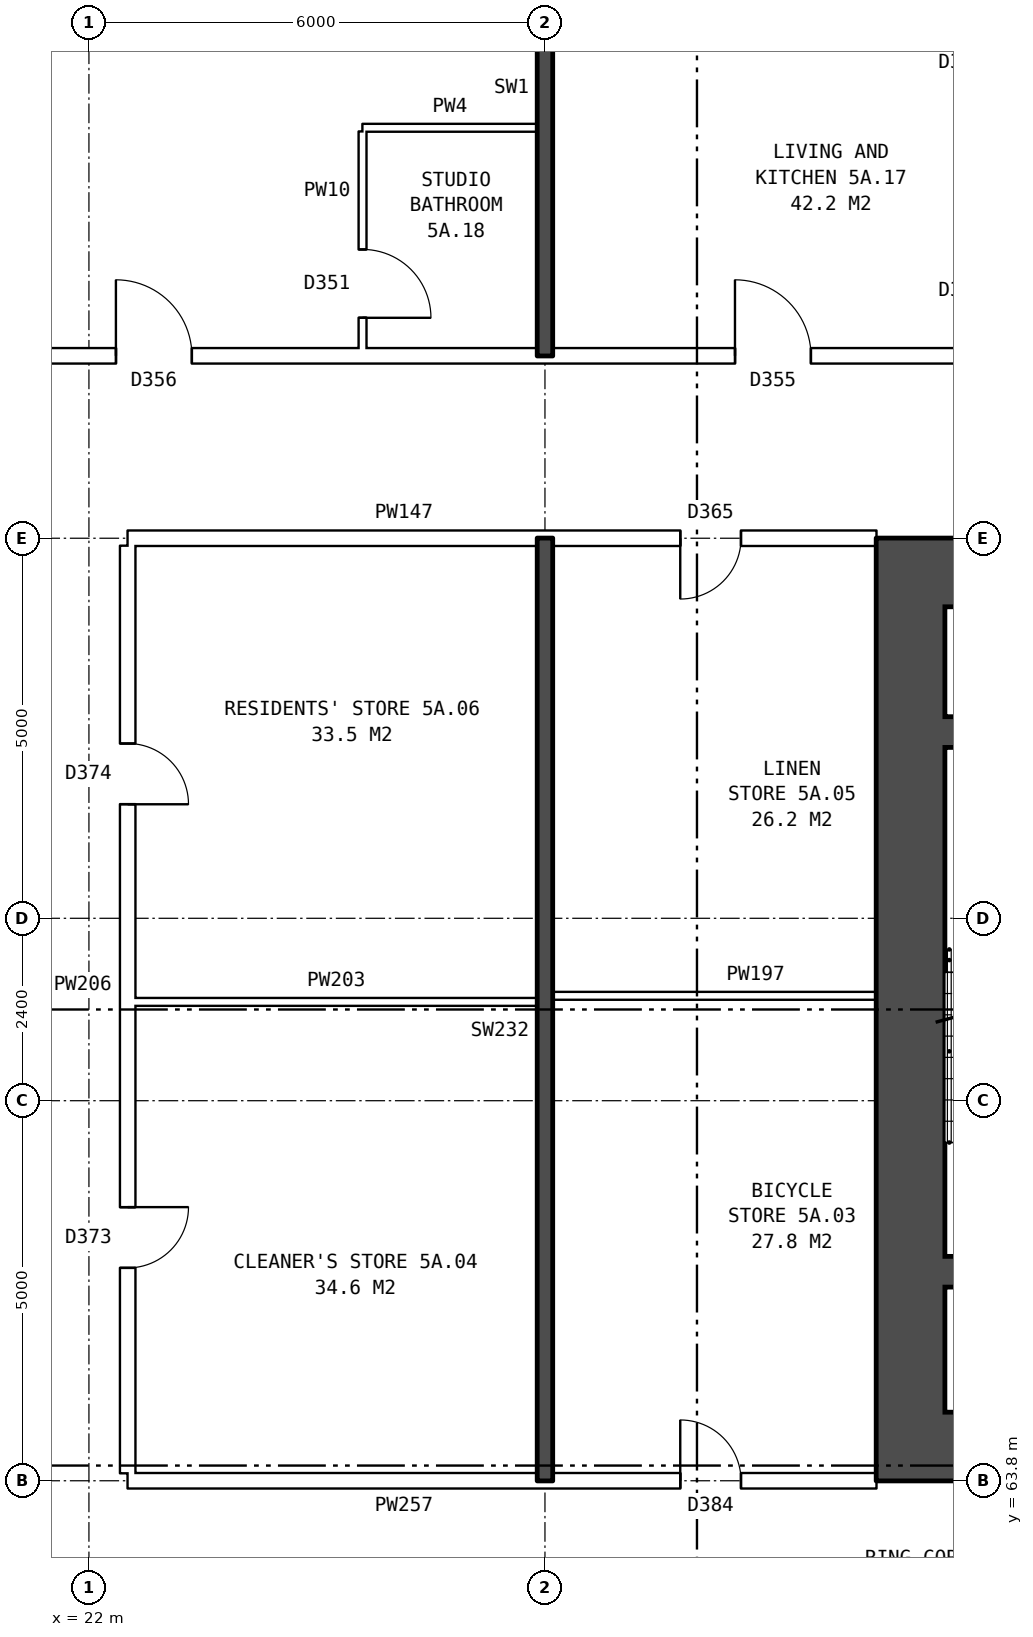
"""IFC4 building model, lengths in metres.
Left out: names, types, materials, properties, quantities, classifications, styles, units other than length and angle.
Written with IfcOpenShell. Run it as: python <this file> out.ifc"""

import sys

from ifc_helpers import new_model, si_unit, direction, frame, frame_2d, origin, place, context, subcontext, project, spatial, rectangle, extrude, element, fill, save


model = new_model("IFC4")
c1 = context("Model", 3, precision=1e-05, world=origin(), true_north=direction((0.0, 1.0)))
c2 = subcontext(c1, "Body", "Model", "MODEL_VIEW")
j1 = project(units=[si_unit("LENGTHUNIT", "METRE"), si_unit("PLANEANGLEUNIT", "RADIAN")], contexts=[c1])
p1 = place(None, origin())
s1 = spatial("IfcSite", under=j1, at=p1, CompositionType="ELEMENT")
p2 = place(p1, origin())
s2 = spatial("IfcBuilding", under=s1, at=p2, CompositionType="ELEMENT")
p3 = place(p2, frame((0.0, 0.0, 22.6)))
s3 = spatial("IfcBuildingStorey", under=s2, at=p3, CompositionType="ELEMENT", Elevation=22.6)
p4 = place(p3, frame((32.81, 75.3, 0.0), z_axis=(0.0, 0.0, 1.0), x_axis=(0.0, -1.0, 0.0)))
e1 = element("IfcWall", 1, at=p4, inside=s3, PredefinedType="SHEAR", context=c2, shape_type="SweptSolid", body=[
    extrude(rectangle(XDim=10.6, YDim=0.9, at=frame_2d((5.3, 0.0))), origin(), (0.0, 0.0, 1.0), 2.85),
])
for number, where, z_axis, x_axis in (
    (2, (41.36, 75.75, 0.0), (0.0, 0.0, 1.0), (-1.0, 0.0, 0.0)),
    (3, (41.36, 64.25, 0.0), (0.0, 0.0, 1.0), (-1.0, 0.0, 0.0)),
):
    element("IfcWall", number, at=place(p3, frame(where, z_axis=z_axis, x_axis=x_axis)), inside=s3, PredefinedType="SHEAR", context=c2, shape_type="SweptSolid", body=[
        extrude(rectangle(XDim=9.0, YDim=0.9, at=frame_2d((4.5, 0.0))), origin(), (0.0, 0.0, 1.0), 2.85),
    ])
for number, where, z_axis, x_axis in (
    (4, (36.26, 73.65, 0.0), (0.0, 0.0, 1.0), (-1.0, 0.0, 0.0)),
    (5, (36.26, 66.55, 0.0), (0.0, 0.0, 1.0), (-1.0, 0.0, 0.0)),
):
    element("IfcWall", number, at=place(p3, frame(where, z_axis=z_axis, x_axis=x_axis)), inside=s3, PredefinedType="SHEAR", context=c2, shape_type="SweptSolid", body=[
        extrude(rectangle(XDim=3.0, YDim=0.4, at=frame_2d((1.5, 0.0))), origin(), (0.0, 0.0, 1.0), 2.85),
    ])
p5 = place(p3, frame((22.51, 63.8, 0.0), z_axis=(0.0, 0.0, 1.0), x_axis=(1.0, 0.0, 0.0)))
e6 = element("IfcWall", 6, at=p5, inside=s3, PredefinedType="PARTITIONING", context=c2, shape_type="SweptSolid", body=[
    extrude(rectangle(XDim=9.85, YDim=0.2, at=frame_2d((4.925, 0.0))), origin(), (0.0, 0.0, 1.0), 2.85),
])
p6 = place(p5, frame((7.27, 0.0, 0.0)))
e7 = element("IfcOpeningElement", 7, at=p6, cuts=e6, PredefinedType="OPENING", context=c2, shape_type="SweptSolid", body=[
    extrude(rectangle(XDim=0.8, YDim=2.1, at=frame_2d((0.4, 1.05))), frame((0.0, 0.11, 0.0), z_axis=(0.0, -1.0, 0.0), x_axis=(1.0, 0.0, 0.0)), (0.0, 0.0, 1.0), 0.22),
])
p7 = place(p3, frame((22.61, 70.1, 0.0), z_axis=(0.0, 0.0, 1.0), x_axis=(1.0, 0.0, 0.0)))
e8 = element("IfcWall", 8, at=p7, inside=s3, PredefinedType="PARTITIONING", context=c2, shape_type="SweptSolid", body=[
    extrude(rectangle(XDim=5.29, YDim=0.1, at=frame_2d((2.645, 0.0))), origin(), (0.0, 0.0, 1.0), 2.85),
])
p8 = place(p3, frame((28.1, 70.18, 0.0), z_axis=(0.0, 0.0, 1.0), x_axis=(1.0, 0.0, 0.0)))
e9 = element("IfcWall", 9, at=p8, inside=s3, PredefinedType="PARTITIONING", context=c2, shape_type="SweptSolid", body=[
    extrude(rectangle(XDim=4.26, YDim=0.1, at=frame_2d((2.13, 0.0))), origin(), (0.0, 0.0, 1.0), 2.85),
])
p9 = place(p3, frame((22.51, 76.2, 0.0), z_axis=(0.0, 0.0, 1.0), x_axis=(1.0, 0.0, 0.0)))
e10 = element("IfcWall", 10, at=p9, inside=s3, PredefinedType="PARTITIONING", context=c2, shape_type="SweptSolid", body=[
    extrude(rectangle(XDim=9.85, YDim=0.2, at=frame_2d((4.925, 0.0))), origin(), (0.0, 0.0, 1.0), 2.85),
])
p10 = place(p9, frame((7.27, 0.0, 0.0)))
e11 = element("IfcOpeningElement", 11, at=p10, cuts=e10, PredefinedType="OPENING", context=c2, shape_type="SweptSolid", body=[
    extrude(rectangle(XDim=0.8, YDim=2.1, at=frame_2d((0.4, 1.05))), frame((0.0, 0.11, 0.0), z_axis=(0.0, -1.0, 0.0), x_axis=(1.0, 0.0, 0.0)), (0.0, 0.0, 1.0), 0.22),
])
p11 = place(p3, frame((20.11, 78.6, 0.0), z_axis=(0.0, 0.0, 1.0), x_axis=(1.0, 0.0, 0.0)))
e12 = element("IfcWall", 12, at=p11, inside=s3, PredefinedType="PARTITIONING", context=c2, shape_type="SweptSolid", body=[
    extrude(rectangle(XDim=25.79, YDim=0.2, at=frame_2d((12.895, 0.0))), origin(), (0.0, 0.0, 1.0), 2.85),
])
p12 = place(p11, frame((22.34, 0.0, 0.0)))
e13 = element("IfcOpeningElement", 13, at=p12, cuts=e12, PredefinedType="OPENING", context=c2, shape_type="SweptSolid", body=[
    extrude(rectangle(XDim=1.0, YDim=2.1, at=frame_2d((0.5, 1.05))), frame((0.0, 0.11, 0.0), z_axis=(0.0, -1.0, 0.0), x_axis=(1.0, 0.0, 0.0)), (0.0, 0.0, 1.0), 0.22),
])
p13 = place(p11, frame((10.39, 0.0, 0.0)))
e14 = element("IfcOpeningElement", 14, at=p13, cuts=e12, PredefinedType="OPENING", context=c2, shape_type="SweptSolid", body=[
    extrude(rectangle(XDim=1.0, YDim=2.1, at=frame_2d((0.5, 1.05))), frame((0.0, 0.11, 0.0), z_axis=(0.0, -1.0, 0.0), x_axis=(1.0, 0.0, 0.0)), (0.0, 0.0, 1.0), 0.22),
])
p14 = place(p11, frame((2.245, 0.0, 0.0)))
e15 = element("IfcOpeningElement", 15, at=p14, cuts=e12, PredefinedType="OPENING", context=c2, shape_type="SweptSolid", body=[
    extrude(rectangle(XDim=1.0, YDim=2.1, at=frame_2d((0.5, 1.05))), frame((0.0, 0.11, 0.0), z_axis=(0.0, -1.0, 0.0), x_axis=(1.0, 0.0, 0.0)), (0.0, 0.0, 1.0), 0.22),
])
p15 = place(p3, frame((25.6, 81.6, 0.0), z_axis=(0.0, 0.0, 1.0), x_axis=(1.0, 0.0, 0.0)))
e16 = element("IfcWall", 16, at=p15, inside=s3, PredefinedType="PARTITIONING", context=c2, shape_type="SweptSolid", body=[
    extrude(rectangle(XDim=2.3, YDim=0.1, at=frame_2d((1.15, 0.0))), origin(), (0.0, 0.0, 1.0), 2.85),
])
p16 = place(p3, frame((22.51, 63.9, 0.0), z_axis=(0.0, 0.0, 1.0), x_axis=(0.0, 1.0, 0.0)))
e17 = element("IfcWall", 17, at=p16, inside=s3, PredefinedType="PARTITIONING", context=c2, shape_type="SweptSolid", body=[
    extrude(rectangle(XDim=12.2, YDim=0.2, at=frame_2d((6.1, 0.0))), origin(), (0.0, 0.0, 1.0), 2.85),
])
p17 = place(p16, frame((2.7, 0.0, 0.0)))
e18 = element("IfcOpeningElement", 18, at=p17, cuts=e17, PredefinedType="OPENING", context=c2, shape_type="SweptSolid", body=[
    extrude(rectangle(XDim=0.8, YDim=2.1, at=frame_2d((0.4, 1.05))), frame((0.0, 0.11, 0.0), z_axis=(0.0, -1.0, 0.0), x_axis=(1.0, 0.0, 0.0)), (0.0, 0.0, 1.0), 0.22),
])
p18 = place(p16, frame((8.8, 0.0, 0.0)))
e19 = element("IfcOpeningElement", 19, at=p18, cuts=e17, PredefinedType="OPENING", context=c2, shape_type="SweptSolid", body=[
    extrude(rectangle(XDim=0.8, YDim=2.1, at=frame_2d((0.4, 1.05))), frame((0.0, 0.11, 0.0), z_axis=(0.0, -1.0, 0.0), x_axis=(1.0, 0.0, 0.0)), (0.0, 0.0, 1.0), 0.22),
])
p19 = place(p3, frame((25.6, 78.7, 0.0), z_axis=(0.0, 0.0, 1.0), x_axis=(0.0, 1.0, 0.0)))
e20 = element("IfcWall", 20, at=p19, inside=s3, PredefinedType="PARTITIONING", context=c2, shape_type="SweptSolid", body=[
    extrude(rectangle(XDim=2.85, YDim=0.1, at=frame_2d((1.425, 0.0))), origin(), (0.0, 0.0, 1.0), 2.85),
])
p20 = place(p19, frame((0.4, 0.0, 0.0)))
e21 = element("IfcOpeningElement", 21, at=p20, cuts=e20, PredefinedType="OPENING", context=c2, shape_type="SweptSolid", body=[
    extrude(rectangle(XDim=0.9, YDim=2.1, at=frame_2d((0.45, 1.05))), frame((0.0, 0.06, 0.0), z_axis=(0.0, -1.0, 0.0), x_axis=(1.0, 0.0, 0.0)), (0.0, 0.0, 1.0), 0.12),
])
p21 = place(p3, frame((28.0, 63.8, 0.0), z_axis=(0.0, 0.0, 1.0), x_axis=(0.0, 1.0, 0.0)))
e22 = element("IfcWall", 22, at=p21, inside=s3, PredefinedType="SOLIDWALL", context=c2, shape_type="SweptSolid", body=[
    extrude(rectangle(XDim=12.4, YDim=0.2, at=frame_2d((6.2, 0.0))), origin(), (0.0, 0.0, 1.0), 2.85),
])
p22 = place(p3, frame((28.0, 78.6, 0.0), z_axis=(0.0, 0.0, 1.0), x_axis=(0.0, 1.0, 0.0)))
e23 = element("IfcWall", 23, at=p22, inside=s3, PredefinedType="SOLIDWALL", context=c2, shape_type="SweptSolid", body=[
    extrude(rectangle(XDim=7.04, YDim=0.2, at=frame_2d((3.52, 0.0))), origin(), (0.0, 0.0, 1.0), 2.85),
])
p23 = place(p6, origin())
e24 = element("IfcDoor", 24, at=p23, inside=s3, OperationType="SINGLE_SWING_LEFT", PredefinedType="DOOR", context=c2, shape_type="SweptSolid", body=[
    extrude(rectangle(XDim=0.8, YDim=2.1, at=frame_2d((0.4, 1.05))), frame((0.0, 0.025, 0.0), z_axis=(0.0, -1.0, 0.0), x_axis=(1.0, 0.0, 0.0)), (0.0, 0.0, 1.0), 0.05),
])
fill(e7, e24)
p24 = place(p17, frame((0.8, 0.0, 0.0), z_axis=(0.0, 0.0, 1.0), x_axis=(-1.0, 0.0, 0.0)))
e25 = element("IfcDoor", 25, at=p24, inside=s3, OperationType="SINGLE_SWING_LEFT", PredefinedType="DOOR", context=c2, shape_type="SweptSolid", body=[
    extrude(rectangle(XDim=0.8, YDim=2.1, at=frame_2d((0.4, 1.05))), frame((0.0, 0.025, 0.0), z_axis=(0.0, -1.0, 0.0), x_axis=(1.0, 0.0, 0.0)), (0.0, 0.0, 1.0), 0.05),
])
fill(e18, e25)
p25 = place(p10, frame((0.8, 0.0, 0.0), z_axis=(0.0, 0.0, 1.0), x_axis=(-1.0, 0.0, 0.0)))
e26 = element("IfcDoor", 26, at=p25, inside=s3, OperationType="SINGLE_SWING_RIGHT", PredefinedType="DOOR", context=c2, shape_type="SweptSolid", body=[
    extrude(rectangle(XDim=0.8, YDim=2.1, at=frame_2d((0.4, 1.05))), frame((0.0, 0.025, 0.0), z_axis=(0.0, -1.0, 0.0), x_axis=(1.0, 0.0, 0.0)), (0.0, 0.0, 1.0), 0.05),
])
fill(e11, e26)
p26 = place(p18, frame((0.8, 0.0, 0.0), z_axis=(0.0, 0.0, 1.0), x_axis=(-1.0, 0.0, 0.0)))
e27 = element("IfcDoor", 27, at=p26, inside=s3, OperationType="SINGLE_SWING_RIGHT", PredefinedType="DOOR", context=c2, shape_type="SweptSolid", body=[
    extrude(rectangle(XDim=0.8, YDim=2.1, at=frame_2d((0.4, 1.05))), frame((0.0, 0.025, 0.0), z_axis=(0.0, -1.0, 0.0), x_axis=(1.0, 0.0, 0.0)), (0.0, 0.0, 1.0), 0.05),
])
fill(e19, e27)
p27 = place(p13, origin())
e28 = element("IfcDoor", 28, at=p27, inside=s3, OperationType="SINGLE_SWING_LEFT", PredefinedType="DOOR", context=c2, shape_type="SweptSolid", body=[
    extrude(rectangle(XDim=1.0, YDim=2.1, at=frame_2d((0.5, 1.05))), frame((0.0, 0.025, 0.0), z_axis=(0.0, -1.0, 0.0), x_axis=(1.0, 0.0, 0.0)), (0.0, 0.0, 1.0), 0.05),
])
fill(e14, e28)
p28 = place(p14, origin())
e29 = element("IfcDoor", 29, at=p28, inside=s3, OperationType="SINGLE_SWING_LEFT", PredefinedType="DOOR", context=c2, shape_type="SweptSolid", body=[
    extrude(rectangle(XDim=1.0, YDim=2.1, at=frame_2d((0.5, 1.05))), frame((0.0, 0.025, 0.0), z_axis=(0.0, -1.0, 0.0), x_axis=(1.0, 0.0, 0.0)), (0.0, 0.0, 1.0), 0.05),
])
fill(e15, e29)
p29 = place(p20, frame((0.9, 0.0, 0.0), z_axis=(0.0, 0.0, 1.0), x_axis=(-1.0, 0.0, 0.0)))
e30 = element("IfcDoor", 30, at=p29, inside=s3, OperationType="SINGLE_SWING_RIGHT", PredefinedType="DOOR", context=c2, shape_type="SweptSolid", body=[
    extrude(rectangle(XDim=0.9, YDim=2.1, at=frame_2d((0.45, 1.05))), frame((0.0, 0.025, 0.0), z_axis=(0.0, -1.0, 0.0), x_axis=(1.0, 0.0, 0.0)), (0.0, 0.0, 1.0), 0.05),
])
fill(e21, e30)
save(model, sys.argv[1])
